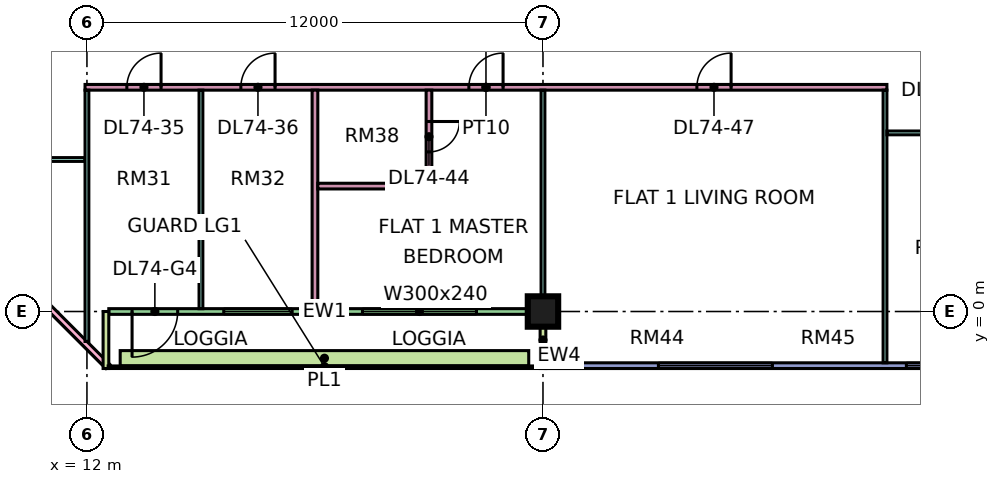
"""IFC4 building model, lengths in metres.
Left out: names, types, materials, properties, quantities, classifications, styles, units other than length and angle.
Written with IfcOpenShell. Run it as: python <this file> out.ifc"""

import sys

from ifc_helpers import new_model, si_unit, direction, frame, frame_2d, origin, origin_2d, place, context, subcontext, project, spatial, rectangle, extrude, element, fill, save


model = new_model("IFC4")
c1 = context("Model", 3, precision=1e-05, world=origin(), true_north=direction((0.0, 1.0)))
c2 = subcontext(c1, "Body", "Model", "MODEL_VIEW")
j1 = project(units=[si_unit("LENGTHUNIT", "METRE"), si_unit("PLANEANGLEUNIT", "RADIAN")], contexts=[c1])
p1 = place(None, origin())
s1 = spatial("IfcSite", under=j1, at=p1, CompositionType="ELEMENT")
p2 = place(p1, origin())
s2 = spatial("IfcBuilding", under=s1, at=p2, CompositionType="ELEMENT")
p3 = place(p2, frame((0.0, 0.0, 314.65)))
s3 = spatial("IfcBuildingStorey", under=s2, at=p3, CompositionType="ELEMENT", Elevation=314.65)
p4 = place(p3, frame((24.0, 0.0, 0.0), z_axis=(0.0, 0.0, 1.0), x_axis=(1.0, 0.0, 0.0)))
e1 = element("IfcColumn", 1, at=p4, inside=s3, PredefinedType="COLUMN", context=c2, shape_type="SweptSolid", body=[
    extrude(rectangle(XDim=0.8, YDim=0.8, at=origin_2d()), origin(), (0.0, 0.0, 1.0), 3.75),
])
p5 = place(p3, frame((-1.447, 12.553, 0.0), z_axis=(0.0, 0.0, 1.0), x_axis=(0.707106781187, -0.707106781187, 0.0)))
e2 = element("IfcWall", 2, at=p5, inside=s3, PredefinedType="SOLIDWALL", context=c2, shape_type="SweptSolid", body=[
    extrude(rectangle(XDim=19.799, YDim=0.15, at=frame_2d((9.899, 0.0))), origin(), (0.0, 0.0, 1.0), 3.35),
])
p6 = place(p5, frame((2.212, 0.0, 0.45)))
e3 = element("IfcOpeningElement", 3, at=p6, cuts=e2, PredefinedType="OPENING", context=c2, shape_type="SweptSolid", body=[
    extrude(rectangle(XDim=3.0, YDim=2.4, at=frame_2d((1.5, 1.2))), frame((0.0, 0.085, 0.0), z_axis=(0.0, -1.0, 0.0), x_axis=(1.0, 0.0, 0.0)), (0.0, 0.0, 1.0), 0.17),
])
p7 = place(p5, frame((10.216, 0.0, 0.45)))
e4 = element("IfcOpeningElement", 4, at=p7, cuts=e2, PredefinedType="OPENING", context=c2, shape_type="SweptSolid", body=[
    extrude(rectangle(XDim=3.0, YDim=2.4, at=frame_2d((1.5, 1.2))), frame((0.0, 0.085, 0.0), z_axis=(0.0, -1.0, 0.0), x_axis=(1.0, 0.0, 0.0)), (0.0, 0.0, 1.0), 0.17),
])
p8 = place(p3, frame((12.575, 0.0, 0.0), z_axis=(0.0, 0.0, 1.0), x_axis=(1.0, 0.0, 0.0)))
e5 = element("IfcWall", 5, at=p8, inside=s3, PredefinedType="SOLIDWALL", context=c2, shape_type="SweptSolid", body=[
    extrude(rectangle(XDim=11.35, YDim=0.15, at=frame_2d((5.675, 0.0))), origin(), (0.0, 0.0, 1.0), 3.35),
])
p9 = place(p8, frame((0.613, 0.0, 0.0)))
e6 = element("IfcOpeningElement", 6, at=p9, cuts=e5, PredefinedType="OPENING", context=c2, shape_type="SweptSolid", body=[
    extrude(rectangle(XDim=1.2, YDim=2.4, at=frame_2d((0.6, 1.2))), frame((0.0, 0.085, 0.0), z_axis=(0.0, -1.0, 0.0), x_axis=(1.0, 0.0, 0.0)), (0.0, 0.0, 1.0), 0.17),
])
p10 = place(p8, frame((3.025, 0.0, 0.45)))
e7 = element("IfcOpeningElement", 7, at=p10, cuts=e5, PredefinedType="OPENING", context=c2, shape_type="SweptSolid", body=[
    extrude(rectangle(XDim=1.8, YDim=2.4, at=frame_2d((0.9, 1.2))), frame((0.0, 0.085, 0.0), z_axis=(0.0, -1.0, 0.0), x_axis=(1.0, 0.0, 0.0)), (0.0, 0.0, 1.0), 0.17),
])
p11 = place(p8, frame((6.675, 0.0, 0.45)))
e8 = element("IfcOpeningElement", 8, at=p11, cuts=e5, PredefinedType="OPENING", context=c2, shape_type="SweptSolid", body=[
    extrude(rectangle(XDim=3.0, YDim=2.4, at=frame_2d((1.5, 1.2))), frame((0.0, 0.085, 0.0), z_axis=(0.0, -1.0, 0.0), x_axis=(1.0, 0.0, 0.0)), (0.0, 0.0, 1.0), 0.17),
])
for number, where, z_axis, x_axis in (
    (9, (12.5, -1.5, 0.0), (0.0, 0.0, 1.0), (0.0, 1.0, 0.0)),
    (10, (24.0, -1.5, 0.0), (0.0, 0.0, 1.0), (0.0, 1.0, 0.0)),
):
    element("IfcWall", number, at=place(p3, frame(where, z_axis=z_axis, x_axis=x_axis)), inside=s3, PredefinedType="SOLIDWALL", context=c2, shape_type="SweptSolid", body=[
        extrude(rectangle(XDim=1.5, YDim=0.15, at=frame_2d((0.75, 0.0))), origin(), (0.0, 0.0, 1.0), 3.35),
    ])
p12 = place(p3, frame((24.075, -1.425, 0.0), z_axis=(0.0, 0.0, 1.0), x_axis=(1.0, 0.0, 0.0)))
e11 = element("IfcWall", 11, at=p12, inside=s3, PredefinedType="SOLIDWALL", context=c2, shape_type="SweptSolid", body=[
    extrude(rectangle(XDim=11.85, YDim=0.15, at=frame_2d((5.925, 0.0))), origin(), (0.0, 0.0, 1.0), 3.35),
])
p13 = place(p12, frame((2.962, 0.0, 0.45)))
e12 = element("IfcOpeningElement", 12, at=p13, cuts=e11, PredefinedType="OPENING", context=c2, shape_type="SweptSolid", body=[
    extrude(rectangle(XDim=3.0, YDim=2.4, at=frame_2d((1.5, 1.2))), frame((0.0, 0.085, 0.0), z_axis=(0.0, -1.0, 0.0), x_axis=(1.0, 0.0, 0.0)), (0.0, 0.0, 1.0), 0.17),
])
p14 = place(p12, frame((9.488, 0.0, 0.45)))
e13 = element("IfcOpeningElement", 13, at=p14, cuts=e11, PredefinedType="OPENING", context=c2, shape_type="SweptSolid", body=[
    extrude(rectangle(XDim=1.8, YDim=2.4, at=frame_2d((0.9, 1.2))), frame((0.0, 0.085, 0.0), z_axis=(0.0, -1.0, 0.0), x_axis=(1.0, 0.0, 0.0)), (0.0, 0.0, 1.0), 0.17),
])
p15 = place(p3, frame((12.875, -1.229, 0.0), z_axis=(0.0, 0.0, 1.0), x_axis=(1.0, 0.0, 0.0)))
e14 = element("IfcWall", 14, at=p15, inside=s3, PredefinedType="SOLIDWALL", context=c2, shape_type="SweptSolid", body=[
    extrude(rectangle(XDim=10.75, YDim=0.4, at=frame_2d((5.375, 0.0))), origin(), (0.0, 0.0, 1.0), 0.7),
])
p16 = place(p3, frame((9.05, 4.0, 0.0), z_axis=(0.0, 0.0, 1.0), x_axis=(1.0, 0.0, 0.0)))
e15 = element("IfcWall", 15, at=p16, inside=s3, PredefinedType="PARTITIONING", context=c2, shape_type="SweptSolid", body=[
    extrude(rectangle(XDim=2.9, YDim=0.1, at=frame_2d((1.45, 0.0))), origin(), (0.0, 0.0, 1.0), 3.35),
])
p17 = place(p3, frame((11.95, 5.9, 0.0), z_axis=(0.0, 0.0, 1.0), x_axis=(1.0, 0.0, 0.0)))
e16 = element("IfcWall", 16, at=p17, inside=s3, PredefinedType="PARTITIONING", context=c2, shape_type="SweptSolid", body=[
    extrude(rectangle(XDim=21.1, YDim=0.15, at=frame_2d((10.55, 0.0))), origin(), (0.0, 0.0, 1.0), 3.35),
])
p18 = place(p17, frame((1.1, 0.0, 0.0)))
e17 = element("IfcOpeningElement", 17, at=p18, cuts=e16, PredefinedType="OPENING", context=c2, shape_type="SweptSolid", body=[
    extrude(rectangle(XDim=0.9, YDim=2.1, at=frame_2d((0.45, 1.05))), frame((0.0, 0.085, 0.0), z_axis=(0.0, -1.0, 0.0), x_axis=(1.0, 0.0, 0.0)), (0.0, 0.0, 1.0), 0.17),
])
p19 = place(p17, frame((4.1, 0.0, 0.0)))
e18 = element("IfcOpeningElement", 18, at=p19, cuts=e16, PredefinedType="OPENING", context=c2, shape_type="SweptSolid", body=[
    extrude(rectangle(XDim=0.9, YDim=2.1, at=frame_2d((0.45, 1.05))), frame((0.0, 0.085, 0.0), z_axis=(0.0, -1.0, 0.0), x_axis=(1.0, 0.0, 0.0)), (0.0, 0.0, 1.0), 0.17),
])
p20 = place(p17, frame((10.1, 0.0, 0.0)))
e19 = element("IfcOpeningElement", 19, at=p20, cuts=e16, PredefinedType="OPENING", context=c2, shape_type="SweptSolid", body=[
    extrude(rectangle(XDim=0.9, YDim=2.1, at=frame_2d((0.45, 1.05))), frame((0.0, 0.085, 0.0), z_axis=(0.0, -1.0, 0.0), x_axis=(1.0, 0.0, 0.0)), (0.0, 0.0, 1.0), 0.17),
])
p21 = place(p17, frame((16.1, 0.0, 0.0)))
e20 = element("IfcOpeningElement", 20, at=p21, cuts=e16, PredefinedType="OPENING", context=c2, shape_type="SweptSolid", body=[
    extrude(rectangle(XDim=0.9, YDim=2.1, at=frame_2d((0.45, 1.05))), frame((0.0, 0.085, 0.0), z_axis=(0.0, -1.0, 0.0), x_axis=(1.0, 0.0, 0.0)), (0.0, 0.0, 1.0), 0.17),
])
p22 = place(p3, frame((12.0, -0.788, 0.0), z_axis=(0.0, 0.0, 1.0), x_axis=(0.0, 1.0, 0.0)))
e21 = element("IfcWall", 21, at=p22, inside=s3, PredefinedType="PARTITIONING", context=c2, shape_type="SweptSolid", body=[
    extrude(rectangle(XDim=6.613, YDim=0.1, at=frame_2d((3.306, 0.0))), origin(), (0.0, 0.0, 1.0), 3.35),
])
p23 = place(p3, frame((15.0, 0.074, 0.0), z_axis=(0.0, 0.0, 1.0), x_axis=(0.0, 1.0, 0.0)))
e22 = element("IfcWall", 22, at=p23, inside=s3, PredefinedType="PARTITIONING", context=c2, shape_type="SweptSolid", body=[
    extrude(rectangle(XDim=5.751, YDim=0.1, at=frame_2d((2.875, 0.0))), origin(), (0.0, 0.0, 1.0), 3.35),
])
p24 = place(p3, frame((18.0, 0.074, 0.0), z_axis=(0.0, 0.0, 1.0), x_axis=(0.0, 1.0, 0.0)))
e23 = element("IfcWall", 23, at=p24, inside=s3, PredefinedType="PARTITIONING", context=c2, shape_type="SweptSolid", body=[
    extrude(rectangle(XDim=5.751, YDim=0.15, at=frame_2d((2.875, 0.0))), origin(), (0.0, 0.0, 1.0), 3.35),
])
p25 = place(p3, frame((18.075, 3.3, 0.0), z_axis=(0.0, 0.0, 1.0), x_axis=(1.0, 0.0, 0.0)))
e24 = element("IfcWall", 24, at=p25, inside=s3, PredefinedType="PARTITIONING", context=c2, shape_type="SweptSolid", body=[
    extrude(rectangle(XDim=3.0, YDim=0.15, at=frame_2d((1.5, 0.0))), origin(), (0.0, 0.0, 1.0), 3.35),
])
p26 = place(p3, frame((21.0, 3.375, 0.0), z_axis=(0.0, 0.0, 1.0), x_axis=(0.0, 1.0, 0.0)))
e25 = element("IfcWall", 25, at=p26, inside=s3, PredefinedType="PARTITIONING", context=c2, shape_type="SweptSolid", body=[
    extrude(rectangle(XDim=2.45, YDim=0.15, at=frame_2d((1.225, 0.0))), origin(), (0.0, 0.0, 1.0), 3.35),
])
p27 = place(p26, frame((0.825, 0.0, 0.0)))
e26 = element("IfcOpeningElement", 26, at=p27, cuts=e25, PredefinedType="OPENING", context=c2, shape_type="SweptSolid", body=[
    extrude(rectangle(XDim=0.8, YDim=2.1, at=frame_2d((0.4, 1.05))), frame((0.0, 0.085, 0.0), z_axis=(0.0, -1.0, 0.0), x_axis=(1.0, 0.0, 0.0)), (0.0, 0.0, 1.0), 0.17),
])
p28 = place(p3, frame((24.0, 0.0, 0.0), z_axis=(0.0, 0.0, 1.0), x_axis=(0.0, 1.0, 0.0)))
e27 = element("IfcWall", 27, at=p28, inside=s3, PredefinedType="PARTITIONING", context=c2, shape_type="SweptSolid", body=[
    extrude(rectangle(XDim=5.825, YDim=0.1, at=frame_2d((2.913, 0.0))), origin(), (0.0, 0.0, 1.0), 3.35),
])
p29 = place(p3, frame((33.0, -1.35, 0.0), z_axis=(0.0, 0.0, 1.0), x_axis=(0.0, 1.0, 0.0)))
e28 = element("IfcWall", 28, at=p29, inside=s3, PredefinedType="PARTITIONING", context=c2, shape_type="SweptSolid", body=[
    extrude(rectangle(XDim=7.175, YDim=0.1, at=frame_2d((3.587, 0.0))), origin(), (0.0, 0.0, 1.0), 3.35),
])
p30 = place(p3, frame((33.05, 4.7, 0.0), z_axis=(0.0, 0.0, 1.0), x_axis=(1.0, 0.0, 0.0)))
e29 = element("IfcWall", 29, at=p30, inside=s3, PredefinedType="PARTITIONING", context=c2, shape_type="SweptSolid", body=[
    extrude(rectangle(XDim=20.85, YDim=0.1, at=frame_2d((10.425, 0.0))), origin(), (0.0, 0.0, 1.0), 3.35),
])
p31 = place(p30, frame((1.0, 0.0, 0.0)))
e30 = element("IfcOpeningElement", 30, at=p31, cuts=e29, PredefinedType="OPENING", context=c2, shape_type="SweptSolid", body=[
    extrude(rectangle(XDim=0.9, YDim=2.1, at=frame_2d((0.45, 1.05))), frame((0.0, 0.06, 0.0), z_axis=(0.0, -1.0, 0.0), x_axis=(1.0, 0.0, 0.0)), (0.0, 0.0, 1.0), 0.12),
])
p32 = place(p30, frame((4.0, 0.0, 0.0)))
e31 = element("IfcOpeningElement", 31, at=p32, cuts=e29, PredefinedType="OPENING", context=c2, shape_type="SweptSolid", body=[
    extrude(rectangle(XDim=0.9, YDim=2.1, at=frame_2d((0.45, 1.05))), frame((0.0, 0.06, 0.0), z_axis=(0.0, -1.0, 0.0), x_axis=(1.0, 0.0, 0.0)), (0.0, 0.0, 1.0), 0.12),
])
p33 = place(p30, frame((16.0, 0.0, 0.0)))
e32 = element("IfcOpeningElement", 32, at=p33, cuts=e29, PredefinedType="OPENING", context=c2, shape_type="SweptSolid", body=[
    extrude(rectangle(XDim=0.9, YDim=2.1, at=frame_2d((0.45, 1.05))), frame((0.0, 0.06, 0.0), z_axis=(0.0, -1.0, 0.0), x_axis=(1.0, 0.0, 0.0)), (0.0, 0.0, 1.0), 0.12),
])
p34 = place(p30, frame((19.0, 0.0, 0.0)))
e33 = element("IfcOpeningElement", 33, at=p34, cuts=e29, PredefinedType="OPENING", context=c2, shape_type="SweptSolid", body=[
    extrude(rectangle(XDim=0.9, YDim=2.1, at=frame_2d((0.45, 1.05))), frame((0.0, 0.06, 0.0), z_axis=(0.0, -1.0, 0.0), x_axis=(1.0, 0.0, 0.0)), (0.0, 0.0, 1.0), 0.12),
])
p35 = place(p30, frame((10.0, 0.0, 0.0)))
e34 = element("IfcOpeningElement", 34, at=p35, cuts=e29, PredefinedType="OPENING", context=c2, shape_type="SweptSolid", body=[
    extrude(rectangle(XDim=0.9, YDim=2.1, at=frame_2d((0.45, 1.05))), frame((0.0, 0.06, 0.0), z_axis=(0.0, -1.0, 0.0), x_axis=(1.0, 0.0, 0.0)), (0.0, 0.0, 1.0), 0.12),
])
p36 = place(p9, frame((1.2, 0.0, 0.0), z_axis=(0.0, 0.0, 1.0), x_axis=(-1.0, 0.0, 0.0)))
e35 = element("IfcDoor", 35, at=p36, inside=s3, OperationType="DOUBLE_DOOR_SINGLE_SWING", PredefinedType="DOOR", context=c2, shape_type="SweptSolid", body=[
    extrude(rectangle(XDim=1.2, YDim=2.4, at=frame_2d((0.6, 1.2))), frame((0.0, 0.025, 0.0), z_axis=(0.0, -1.0, 0.0), x_axis=(1.0, 0.0, 0.0)), (0.0, 0.0, 1.0), 0.05),
])
fill(e6, e35)
p37 = place(p10, origin())
e36 = element("IfcWindow", 36, at=p37, inside=s3, PartitioningType="SINGLE_PANEL", PredefinedType="WINDOW", context=c2, shape_type="SweptSolid", body=[
    extrude(rectangle(XDim=1.8, YDim=2.4, at=frame_2d((0.9, 1.2))), frame((0.0, 0.03, 0.0), z_axis=(0.0, -1.0, 0.0), x_axis=(1.0, 0.0, 0.0)), (0.0, 0.0, 1.0), 0.06),
])
fill(e7, e36)
p38 = place(p11, origin())
e37 = element("IfcWindow", 37, at=p38, inside=s3, PartitioningType="SINGLE_PANEL", PredefinedType="WINDOW", context=c2, shape_type="SweptSolid", body=[
    extrude(rectangle(XDim=3.0, YDim=2.4, at=frame_2d((1.5, 1.2))), frame((0.0, 0.03, 0.0), z_axis=(0.0, -1.0, 0.0), x_axis=(1.0, 0.0, 0.0)), (0.0, 0.0, 1.0), 0.06),
])
fill(e8, e37)
p39 = place(p13, origin())
e38 = element("IfcWindow", 38, at=p39, inside=s3, PartitioningType="SINGLE_PANEL", PredefinedType="WINDOW", context=c2, shape_type="SweptSolid", body=[
    extrude(rectangle(XDim=3.0, YDim=2.4, at=frame_2d((1.5, 1.2))), frame((0.0, 0.03, 0.0), z_axis=(0.0, -1.0, 0.0), x_axis=(1.0, 0.0, 0.0)), (0.0, 0.0, 1.0), 0.06),
])
fill(e12, e38)
p40 = place(p14, origin())
e39 = element("IfcWindow", 39, at=p40, inside=s3, PartitioningType="SINGLE_PANEL", PredefinedType="WINDOW", context=c2, shape_type="SweptSolid", body=[
    extrude(rectangle(XDim=1.8, YDim=2.4, at=frame_2d((0.9, 1.2))), frame((0.0, 0.03, 0.0), z_axis=(0.0, -1.0, 0.0), x_axis=(1.0, 0.0, 0.0)), (0.0, 0.0, 1.0), 0.06),
])
fill(e13, e39)
p41 = place(p18, frame((0.9, 0.0, 0.0), z_axis=(0.0, 0.0, 1.0), x_axis=(-1.0, 0.0, 0.0)))
e40 = element("IfcDoor", 40, at=p41, inside=s3, OperationType="SINGLE_SWING_RIGHT", PredefinedType="DOOR", context=c2, shape_type="SweptSolid", body=[
    extrude(rectangle(XDim=0.9, YDim=2.1, at=frame_2d((0.45, 1.05))), frame((0.0, 0.025, 0.0), z_axis=(0.0, -1.0, 0.0), x_axis=(1.0, 0.0, 0.0)), (0.0, 0.0, 1.0), 0.05),
])
fill(e17, e40)
p42 = place(p19, frame((0.9, 0.0, 0.0), z_axis=(0.0, 0.0, 1.0), x_axis=(-1.0, 0.0, 0.0)))
e41 = element("IfcDoor", 41, at=p42, inside=s3, OperationType="SINGLE_SWING_RIGHT", PredefinedType="DOOR", context=c2, shape_type="SweptSolid", body=[
    extrude(rectangle(XDim=0.9, YDim=2.1, at=frame_2d((0.45, 1.05))), frame((0.0, 0.025, 0.0), z_axis=(0.0, -1.0, 0.0), x_axis=(1.0, 0.0, 0.0)), (0.0, 0.0, 1.0), 0.05),
])
fill(e18, e41)
p43 = place(p20, frame((0.9, 0.0, 0.0), z_axis=(0.0, 0.0, 1.0), x_axis=(-1.0, 0.0, 0.0)))
e42 = element("IfcDoor", 42, at=p43, inside=s3, OperationType="SINGLE_SWING_RIGHT", PredefinedType="DOOR", context=c2, shape_type="SweptSolid", body=[
    extrude(rectangle(XDim=0.9, YDim=2.1, at=frame_2d((0.45, 1.05))), frame((0.0, 0.025, 0.0), z_axis=(0.0, -1.0, 0.0), x_axis=(1.0, 0.0, 0.0)), (0.0, 0.0, 1.0), 0.05),
])
fill(e19, e42)
p44 = place(p27, origin())
e43 = element("IfcDoor", 43, at=p44, inside=s3, OperationType="SINGLE_SWING_RIGHT", PredefinedType="DOOR", context=c2, shape_type="SweptSolid", body=[
    extrude(rectangle(XDim=0.8, YDim=2.1, at=frame_2d((0.4, 1.05))), frame((0.0, 0.025, 0.0), z_axis=(0.0, -1.0, 0.0), x_axis=(1.0, 0.0, 0.0)), (0.0, 0.0, 1.0), 0.05),
])
fill(e26, e43)
p45 = place(p21, frame((0.9, 0.0, 0.0), z_axis=(0.0, 0.0, 1.0), x_axis=(-1.0, 0.0, 0.0)))
e44 = element("IfcDoor", 44, at=p45, inside=s3, OperationType="SINGLE_SWING_RIGHT", PredefinedType="DOOR", context=c2, shape_type="SweptSolid", body=[
    extrude(rectangle(XDim=0.9, YDim=2.1, at=frame_2d((0.45, 1.05))), frame((0.0, 0.025, 0.0), z_axis=(0.0, -1.0, 0.0), x_axis=(1.0, 0.0, 0.0)), (0.0, 0.0, 1.0), 0.05),
])
fill(e20, e44)
save(model, sys.argv[1])
